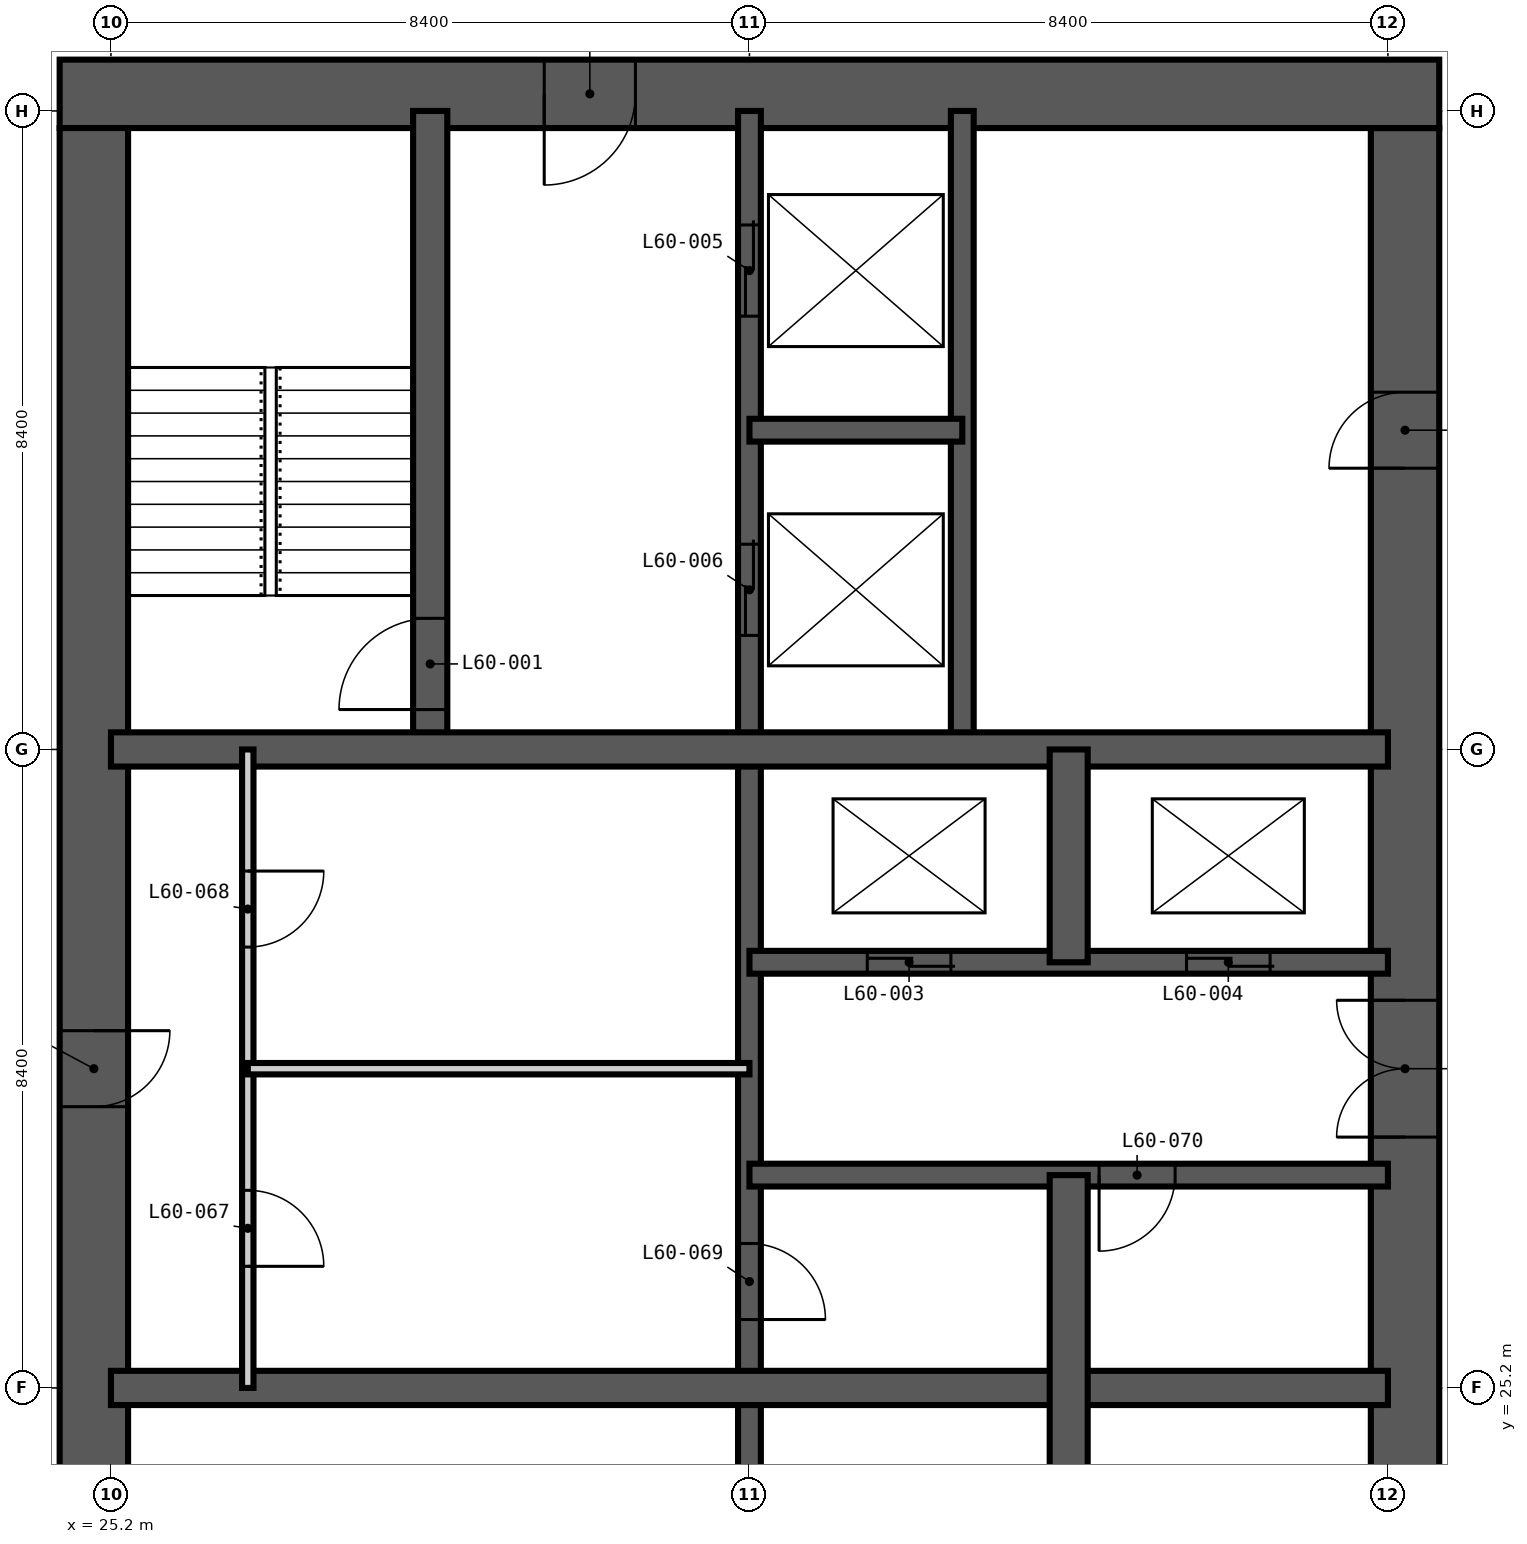
"""IFC4 building model, lengths in metres.
Left out: names, types, materials, properties, quantities, classifications, styles, units other than length and angle.
Written with IfcOpenShell. Run it as: python <this file> out.ifc"""

import sys

from ifc_helpers import new_model, si_unit, direction, frame, frame_2d, origin, place, context, subcontext, project, spatial, rectangle, extrude, element, fill, save


model = new_model("IFC4")
c1 = context("Model", 3, precision=1e-05, world=origin(), true_north=direction((0.0, 1.0)))
c2 = subcontext(c1, "Body", "Model", "MODEL_VIEW")
j1 = project(units=[si_unit("LENGTHUNIT", "METRE"), si_unit("PLANEANGLEUNIT", "RADIAN")], contexts=[c1])
p1 = place(None, origin())
s1 = spatial("IfcSite", under=j1, at=p1, CompositionType="ELEMENT")
p2 = place(p1, origin())
s2 = spatial("IfcBuilding", under=s1, at=p2, CompositionType="ELEMENT")
p3 = place(p2, frame((0.0, 0.0, 233.4)))
s3 = spatial("IfcBuildingStorey", under=s2, at=p3, CompositionType="ELEMENT", Elevation=233.4)
p4 = place(p3, frame((42.225, 17.025, -0.35), z_axis=(0.0, 0.0, 1.0), x_axis=(0.0, 1.0, 0.0)))
e1 = element("IfcWall", 1, at=p4, inside=s3, PredefinedType="SHEAR", context=c2, shape_type="SweptSolid", body=[
    extrude(rectangle(XDim=24.75, YDim=0.9, at=frame_2d((12.375, 0.0))), origin(), (0.0, 0.0, 1.0), 3.9),
])
p5 = place(p4, frame((0.575, 0.0, 0.35)))
e2 = element("IfcOpeningElement", 2, at=p5, cuts=e1, PredefinedType="OPENING", context=c2, shape_type="SweptSolid", body=[
    extrude(rectangle(XDim=1.2, YDim=2.2, at=frame_2d((0.6, 1.1))), frame((0.0, 0.46, 0.0), z_axis=(0.0, -1.0, 0.0), x_axis=(1.0, 0.0, 0.0)), (0.0, 0.0, 1.0), 0.92),
])
p6 = place(p4, frame((11.475, 0.0, 0.35)))
e3 = element("IfcOpeningElement", 3, at=p6, cuts=e1, PredefinedType="OPENING", context=c2, shape_type="SweptSolid", body=[
    extrude(rectangle(XDim=1.8, YDim=2.2, at=frame_2d((0.9, 1.1))), frame((0.0, 0.46, 0.0), z_axis=(0.0, -1.0, 0.0), x_axis=(1.0, 0.0, 0.0)), (0.0, 0.0, 1.0), 0.92),
])
p7 = place(p4, frame((20.275, 0.0, 0.35)))
e4 = element("IfcOpeningElement", 4, at=p7, cuts=e1, PredefinedType="OPENING", context=c2, shape_type="SweptSolid", body=[
    extrude(rectangle(XDim=1.0, YDim=2.1, at=frame_2d((0.5, 1.05))), frame((0.0, 0.46, 0.0), z_axis=(0.0, -1.0, 0.0), x_axis=(1.0, 0.0, 0.0)), (0.0, 0.0, 1.0), 0.92),
])
p8 = place(p3, frame((42.675, 42.225, -0.35), z_axis=(0.0, 0.0, 1.0), x_axis=(-1.0, 0.0, 0.0)))
e5 = element("IfcWall", 5, at=p8, inside=s3, PredefinedType="SHEAR", context=c2, shape_type="SweptSolid", body=[
    extrude(rectangle(XDim=18.15, YDim=0.9, at=frame_2d((9.075, 0.0))), origin(), (0.0, 0.0, 1.0), 3.9),
])
p9 = place(p8, frame((10.575, 0.0, 0.35)))
e6 = element("IfcOpeningElement", 6, at=p9, cuts=e5, PredefinedType="OPENING", context=c2, shape_type="SweptSolid", body=[
    extrude(rectangle(XDim=1.2, YDim=2.2, at=frame_2d((0.6, 1.1))), frame((0.0, 0.46, 0.0), z_axis=(0.0, -1.0, 0.0), x_axis=(1.0, 0.0, 0.0)), (0.0, 0.0, 1.0), 0.92),
])
p10 = place(p3, frame((24.975, 41.775, -0.35), z_axis=(0.0, 0.0, 1.0), x_axis=(0.0, -1.0, 0.0)))
e7 = element("IfcWall", 7, at=p10, inside=s3, PredefinedType="SHEAR", context=c2, shape_type="SweptSolid", body=[
    extrude(rectangle(XDim=24.75, YDim=0.9, at=frame_2d((12.375, 0.0))), origin(), (0.0, 0.0, 1.0), 3.9),
])
p11 = place(p10, frame((11.875, 0.0, 0.35)))
e8 = element("IfcOpeningElement", 8, at=p11, cuts=e7, PredefinedType="OPENING", context=c2, shape_type="SweptSolid", body=[
    extrude(rectangle(XDim=1.0, YDim=2.1, at=frame_2d((0.5, 1.05))), frame((0.0, 0.46, 0.0), z_axis=(0.0, -1.0, 0.0), x_axis=(1.0, 0.0, 0.0)), (0.0, 0.0, 1.0), 0.92),
])
p12 = place(p3, frame((33.6, 16.8, -0.35), z_axis=(0.0, 0.0, 1.0), x_axis=(0.0, 1.0, 0.0)))
e9 = element("IfcWall", 9, at=p12, inside=s3, PredefinedType="SHEAR", context=c2, shape_type="SweptSolid", body=[
    extrude(rectangle(XDim=25.2, YDim=0.3, at=frame_2d((12.6, 0.0))), origin(), (0.0, 0.0, 1.0), 3.9),
])
p13 = place(p12, frame((22.5, 0.0, 0.35)))
e10 = element("IfcOpeningElement", 10, at=p13, cuts=e9, PredefinedType="OPENING", context=c2, shape_type="SweptSolid", body=[
    extrude(rectangle(XDim=1.2, YDim=2.2, at=frame_2d((0.6, 1.1))), frame((0.0, 0.16, 0.0), z_axis=(0.0, -1.0, 0.0), x_axis=(1.0, 0.0, 0.0)), (0.0, 0.0, 1.0), 0.32),
])
p14 = place(p12, frame((18.3, 0.0, 0.35)))
e11 = element("IfcOpeningElement", 11, at=p14, cuts=e9, PredefinedType="OPENING", context=c2, shape_type="SweptSolid", body=[
    extrude(rectangle(XDim=1.2, YDim=2.2, at=frame_2d((0.6, 1.1))), frame((0.0, 0.16, 0.0), z_axis=(0.0, -1.0, 0.0), x_axis=(1.0, 0.0, 0.0)), (0.0, 0.0, 1.0), 0.32),
])
p15 = place(p12, frame((9.3, 0.0, 0.35)))
e12 = element("IfcOpeningElement", 12, at=p15, cuts=e9, PredefinedType="OPENING", context=c2, shape_type="SweptSolid", body=[
    extrude(rectangle(XDim=1.0, YDim=2.1, at=frame_2d((0.5, 1.05))), frame((0.0, 0.16, 0.0), z_axis=(0.0, -1.0, 0.0), x_axis=(1.0, 0.0, 0.0)), (0.0, 0.0, 1.0), 0.32),
])
p16 = place(p3, frame((36.4, 33.6, -0.35), z_axis=(0.0, 0.0, 1.0), x_axis=(0.0, 1.0, 0.0)))
e13 = element("IfcWall", 13, at=p16, inside=s3, PredefinedType="SHEAR", context=c2, shape_type="SweptSolid", body=[
    extrude(rectangle(XDim=8.4, YDim=0.3, at=frame_2d((4.2, 0.0))), origin(), (0.0, 0.0, 1.0), 3.9),
])
p17 = place(p3, frame((33.6, 28.0, -0.35), z_axis=(0.0, 0.0, 1.0), x_axis=(1.0, 0.0, 0.0)))
e14 = element("IfcWall", 14, at=p17, inside=s3, PredefinedType="SHEAR", context=c2, shape_type="SweptSolid", body=[
    extrude(rectangle(XDim=8.4, YDim=0.3, at=frame_2d((4.2, 0.0))), origin(), (0.0, 0.0, 1.0), 3.9),
])
p18 = place(p17, frame((4.6, 0.0, 0.35)))
e15 = element("IfcOpeningElement", 15, at=p18, cuts=e14, PredefinedType="OPENING", context=c2, shape_type="SweptSolid", body=[
    extrude(rectangle(XDim=1.0, YDim=2.1, at=frame_2d((0.5, 1.05))), frame((0.0, 0.16, 0.0), z_axis=(0.0, -1.0, 0.0), x_axis=(1.0, 0.0, 0.0)), (0.0, 0.0, 1.0), 0.32),
])
p19 = place(p3, frame((33.6, 30.8, -0.35), z_axis=(0.0, 0.0, 1.0), x_axis=(1.0, 0.0, 0.0)))
e16 = element("IfcWall", 16, at=p19, inside=s3, PredefinedType="SHEAR", context=c2, shape_type="SweptSolid", body=[
    extrude(rectangle(XDim=8.4, YDim=0.3, at=frame_2d((4.2, 0.0))), origin(), (0.0, 0.0, 1.0), 3.9),
])
p20 = place(p19, frame((1.55, 0.0, 0.35)))
e17 = element("IfcOpeningElement", 17, at=p20, cuts=e16, PredefinedType="OPENING", context=c2, shape_type="SweptSolid", body=[
    extrude(rectangle(XDim=1.1, YDim=2.2, at=frame_2d((0.55, 1.1))), frame((0.0, 0.16, 0.0), z_axis=(0.0, -1.0, 0.0), x_axis=(1.0, 0.0, 0.0)), (0.0, 0.0, 1.0), 0.32),
])
p21 = place(p19, frame((5.75, 0.0, 0.35)))
e18 = element("IfcOpeningElement", 18, at=p21, cuts=e16, PredefinedType="OPENING", context=c2, shape_type="SweptSolid", body=[
    extrude(rectangle(XDim=1.1, YDim=2.2, at=frame_2d((0.55, 1.1))), frame((0.0, 0.16, 0.0), z_axis=(0.0, -1.0, 0.0), x_axis=(1.0, 0.0, 0.0)), (0.0, 0.0, 1.0), 0.32),
])
p22 = place(p3, frame((33.6, 37.8, -0.35), z_axis=(0.0, 0.0, 1.0), x_axis=(1.0, 0.0, 0.0)))
e19 = element("IfcWall", 19, at=p22, inside=s3, PredefinedType="SHEAR", context=c2, shape_type="SweptSolid", body=[
    extrude(rectangle(XDim=2.8, YDim=0.3, at=frame_2d((1.4, 0.0))), origin(), (0.0, 0.0, 1.0), 3.9),
])
p23 = place(p3, frame((29.4, 33.6, -0.35), z_axis=(0.0, 0.0, 1.0), x_axis=(0.0, 1.0, 0.0)))
e20 = element("IfcWall", 20, at=p23, inside=s3, PredefinedType="SHEAR", context=c2, shape_type="SweptSolid", body=[
    extrude(rectangle(XDim=8.4, YDim=0.45, at=frame_2d((4.2, 0.0))), origin(), (0.0, 0.0, 1.0), 3.9),
])
p24 = place(p23, frame((0.525, 0.0, 0.35)))
e21 = element("IfcOpeningElement", 21, at=p24, cuts=e20, PredefinedType="OPENING", context=c2, shape_type="SweptSolid", body=[
    extrude(rectangle(XDim=1.2, YDim=2.2, at=frame_2d((0.6, 1.1))), frame((0.0, 0.235, 0.0), z_axis=(0.0, -1.0, 0.0), x_axis=(1.0, 0.0, 0.0)), (0.0, 0.0, 1.0), 0.47),
])
for number, where, z_axis, x_axis in (
    (22, (25.2, 25.2, -0.35), (0.0, 0.0, 1.0), (1.0, 0.0, 0.0)),
    (23, (25.2, 33.6, -0.35), (0.0, 0.0, 1.0), (1.0, 0.0, 0.0)),
):
    element("IfcWall", number, at=place(p3, frame(where, z_axis=z_axis, x_axis=x_axis)), inside=s3, PredefinedType="SHEAR", context=c2, shape_type="SweptSolid", body=[
        extrude(rectangle(XDim=16.8, YDim=0.45, at=frame_2d((8.4, 0.0))), origin(), (0.0, 0.0, 1.0), 3.9),
    ])
p25 = place(p3, frame((37.8, 16.8, -0.35), z_axis=(0.0, 0.0, 1.0), x_axis=(0.0, 1.0, 0.0)))
e24 = element("IfcWall", 24, at=p25, inside=s3, PredefinedType="SHEAR", context=c2, shape_type="SweptSolid", body=[
    extrude(rectangle(XDim=11.2, YDim=0.5, at=frame_2d((5.6, 0.0))), origin(), (0.0, 0.0, 1.0), 3.9),
])
p26 = place(p3, frame((37.8, 30.8, -0.35), z_axis=(0.0, 0.0, 1.0), x_axis=(0.0, 1.0, 0.0)))
e25 = element("IfcWall", 25, at=p26, inside=s3, PredefinedType="SHEAR", context=c2, shape_type="SweptSolid", body=[
    extrude(rectangle(XDim=2.8, YDim=0.5, at=frame_2d((1.4, 0.0))), origin(), (0.0, 0.0, 1.0), 3.9),
])
p27 = place(p3, frame((27.0, 25.2, 0.0), z_axis=(0.0, 0.0, 1.0), x_axis=(0.0, 1.0, 0.0)))
e26 = element("IfcWall", 26, at=p27, inside=s3, PredefinedType="PARTITIONING", context=c2, shape_type="SweptSolid", body=[
    extrude(rectangle(XDim=8.4, YDim=0.15, at=frame_2d((4.2, 0.0))), origin(), (0.0, 0.0, 1.0), 3.55),
])
p28 = place(p27, frame((1.6, 0.0, 0.0)))
e27 = element("IfcOpeningElement", 27, at=p28, cuts=e26, PredefinedType="OPENING", context=c2, shape_type="SweptSolid", body=[
    extrude(rectangle(XDim=1.0, YDim=2.1, at=frame_2d((0.5, 1.05))), frame((0.0, 0.085, 0.0), z_axis=(0.0, -1.0, 0.0), x_axis=(1.0, 0.0, 0.0)), (0.0, 0.0, 1.0), 0.17),
])
p29 = place(p27, frame((5.8, 0.0, 0.0)))
e28 = element("IfcOpeningElement", 28, at=p29, cuts=e26, PredefinedType="OPENING", context=c2, shape_type="SweptSolid", body=[
    extrude(rectangle(XDim=1.0, YDim=2.1, at=frame_2d((0.5, 1.05))), frame((0.0, 0.085, 0.0), z_axis=(0.0, -1.0, 0.0), x_axis=(1.0, 0.0, 0.0)), (0.0, 0.0, 1.0), 0.17),
])
p30 = place(p3, frame((27.0, 29.4, 0.0), z_axis=(0.0, 0.0, 1.0), x_axis=(1.0, 0.0, 0.0)))
e29 = element("IfcWall", 29, at=p30, inside=s3, PredefinedType="PARTITIONING", context=c2, shape_type="SweptSolid", body=[
    extrude(rectangle(XDim=6.6, YDim=0.15, at=frame_2d((3.3, 0.0))), origin(), (0.0, 0.0, 1.0), 3.55),
])
p31 = place(p24, origin())
e30 = element("IfcDoor", 30, at=p31, inside=s3, OperationType="SINGLE_SWING_LEFT", PredefinedType="DOOR", context=c2, shape_type="SweptSolid", body=[
    extrude(rectangle(XDim=1.2, YDim=2.2, at=frame_2d((0.6, 1.1))), frame((0.0, 0.025, 0.0), z_axis=(0.0, -1.0, 0.0), x_axis=(1.0, 0.0, 0.0)), (0.0, 0.0, 1.0), 0.05),
])
fill(e21, e30)
p32 = place(p20, origin())
e31 = element("IfcDoor", 31, at=p32, inside=s3, OperationType="DOUBLE_DOOR_SLIDING", PredefinedType="DOOR", context=c2, shape_type="SweptSolid", body=[
    extrude(rectangle(XDim=1.1, YDim=2.2, at=frame_2d((0.55, 1.1))), frame((0.0, 0.025, 0.0), z_axis=(0.0, -1.0, 0.0), x_axis=(1.0, 0.0, 0.0)), (0.0, 0.0, 1.0), 0.05),
])
fill(e17, e31)
p33 = place(p21, origin())
e32 = element("IfcDoor", 32, at=p33, inside=s3, OperationType="DOUBLE_DOOR_SLIDING", PredefinedType="DOOR", context=c2, shape_type="SweptSolid", body=[
    extrude(rectangle(XDim=1.1, YDim=2.2, at=frame_2d((0.55, 1.1))), frame((0.0, 0.025, 0.0), z_axis=(0.0, -1.0, 0.0), x_axis=(1.0, 0.0, 0.0)), (0.0, 0.0, 1.0), 0.05),
])
fill(e18, e32)
p34 = place(p13, origin())
e33 = element("IfcDoor", 33, at=p34, inside=s3, OperationType="DOUBLE_DOOR_SLIDING", PredefinedType="DOOR", context=c2, shape_type="SweptSolid", body=[
    extrude(rectangle(XDim=1.2, YDim=2.2, at=frame_2d((0.6, 1.1))), frame((0.0, 0.025, 0.0), z_axis=(0.0, -1.0, 0.0), x_axis=(1.0, 0.0, 0.0)), (0.0, 0.0, 1.0), 0.05),
])
fill(e10, e33)
p35 = place(p14, origin())
e34 = element("IfcDoor", 34, at=p35, inside=s3, OperationType="DOUBLE_DOOR_SLIDING", PredefinedType="DOOR", context=c2, shape_type="SweptSolid", body=[
    extrude(rectangle(XDim=1.2, YDim=2.2, at=frame_2d((0.6, 1.1))), frame((0.0, 0.025, 0.0), z_axis=(0.0, -1.0, 0.0), x_axis=(1.0, 0.0, 0.0)), (0.0, 0.0, 1.0), 0.05),
])
fill(e11, e34)
p36 = place(p11, origin())
e35 = element("IfcDoor", 35, at=p36, inside=s3, OperationType="SINGLE_SWING_LEFT", PredefinedType="DOOR", context=c2, shape_type="SweptSolid", body=[
    extrude(rectangle(XDim=1.0, YDim=2.1, at=frame_2d((0.5, 1.05))), frame((0.0, 0.025, 0.0), z_axis=(0.0, -1.0, 0.0), x_axis=(1.0, 0.0, 0.0)), (0.0, 0.0, 1.0), 0.05),
])
fill(e8, e35)
p37 = place(p28, frame((1.0, 0.0, 0.0), z_axis=(0.0, 0.0, 1.0), x_axis=(-1.0, 0.0, 0.0)))
e36 = element("IfcDoor", 36, at=p37, inside=s3, OperationType="SINGLE_SWING_RIGHT", PredefinedType="DOOR", context=c2, shape_type="SweptSolid", body=[
    extrude(rectangle(XDim=1.0, YDim=2.1, at=frame_2d((0.5, 1.05))), frame((0.0, 0.025, 0.0), z_axis=(0.0, -1.0, 0.0), x_axis=(1.0, 0.0, 0.0)), (0.0, 0.0, 1.0), 0.05),
])
fill(e27, e36)
p38 = place(p29, frame((1.0, 0.0, 0.0), z_axis=(0.0, 0.0, 1.0), x_axis=(-1.0, 0.0, 0.0)))
e37 = element("IfcDoor", 37, at=p38, inside=s3, OperationType="SINGLE_SWING_LEFT", PredefinedType="DOOR", context=c2, shape_type="SweptSolid", body=[
    extrude(rectangle(XDim=1.0, YDim=2.1, at=frame_2d((0.5, 1.05))), frame((0.0, 0.025, 0.0), z_axis=(0.0, -1.0, 0.0), x_axis=(1.0, 0.0, 0.0)), (0.0, 0.0, 1.0), 0.05),
])
fill(e28, e37)
p39 = place(p15, frame((1.0, 0.0, 0.0), z_axis=(0.0, 0.0, 1.0), x_axis=(-1.0, 0.0, 0.0)))
e38 = element("IfcDoor", 38, at=p39, inside=s3, OperationType="SINGLE_SWING_RIGHT", PredefinedType="DOOR", context=c2, shape_type="SweptSolid", body=[
    extrude(rectangle(XDim=1.0, YDim=2.1, at=frame_2d((0.5, 1.05))), frame((0.0, 0.025, 0.0), z_axis=(0.0, -1.0, 0.0), x_axis=(1.0, 0.0, 0.0)), (0.0, 0.0, 1.0), 0.05),
])
fill(e12, e38)
p40 = place(p18, frame((1.0, 0.0, 0.0), z_axis=(0.0, 0.0, 1.0), x_axis=(-1.0, 0.0, 0.0)))
e39 = element("IfcDoor", 39, at=p40, inside=s3, OperationType="SINGLE_SWING_RIGHT", PredefinedType="DOOR", context=c2, shape_type="SweptSolid", body=[
    extrude(rectangle(XDim=1.0, YDim=2.1, at=frame_2d((0.5, 1.05))), frame((0.0, 0.025, 0.0), z_axis=(0.0, -1.0, 0.0), x_axis=(1.0, 0.0, 0.0)), (0.0, 0.0, 1.0), 0.05),
])
fill(e15, e39)
p41 = place(p6, origin())
e40 = element("IfcDoor", 40, at=p41, inside=s3, OperationType="DOUBLE_DOOR_DOUBLE_SWING", PredefinedType="DOOR", context=c2, shape_type="SweptSolid", body=[
    extrude(rectangle(XDim=1.8, YDim=2.2, at=frame_2d((0.9, 1.1))), frame((0.0, 0.025, 0.0), z_axis=(0.0, -1.0, 0.0), x_axis=(1.0, 0.0, 0.0)), (0.0, 0.0, 1.0), 0.05),
])
fill(e3, e40)
p42 = place(p9, origin())
e41 = element("IfcDoor", 41, at=p42, inside=s3, OperationType="SINGLE_SWING_RIGHT", PredefinedType="DOOR", context=c2, shape_type="SweptSolid", body=[
    extrude(rectangle(XDim=1.2, YDim=2.2, at=frame_2d((0.6, 1.1))), frame((0.0, 0.025, 0.0), z_axis=(0.0, -1.0, 0.0), x_axis=(1.0, 0.0, 0.0)), (0.0, 0.0, 1.0), 0.05),
])
fill(e6, e41)
p43 = place(p7, origin())
e42 = element("IfcDoor", 42, at=p43, inside=s3, OperationType="SINGLE_SWING_LEFT", PredefinedType="DOOR", context=c2, shape_type="SweptSolid", body=[
    extrude(rectangle(XDim=1.0, YDim=2.1, at=frame_2d((0.5, 1.05))), frame((0.0, 0.025, 0.0), z_axis=(0.0, -1.0, 0.0), x_axis=(1.0, 0.0, 0.0)), (0.0, 0.0, 1.0), 0.05),
])
fill(e4, e42)
save(model, sys.argv[1])
